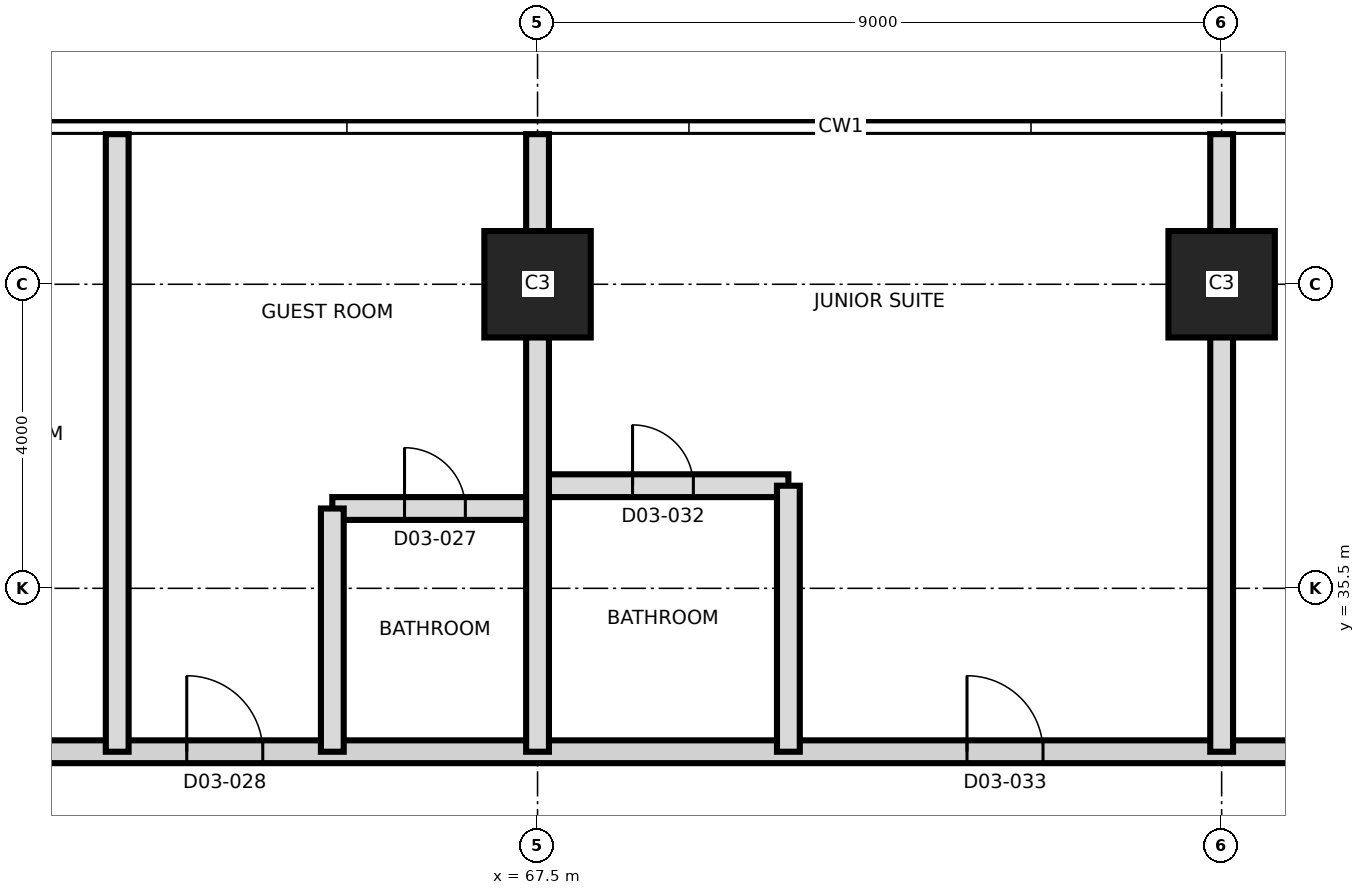
"""IFC4 building model, lengths in metres.
Left out: names, types, materials, properties, quantities, classifications, styles, units other than length and angle.
Written with IfcOpenShell. Run it as: python <this file> out.ifc"""

import sys

from ifc_helpers import new_model, si_unit, direction, frame, frame_2d, origin, origin_2d, place, context, subcontext, project, spatial, rectangle, extrude, element, fill, save


model = new_model("IFC4")
c1 = context("Model", 3, precision=1e-05, world=origin(), true_north=direction((0.0, 1.0)))
c2 = subcontext(c1, "Body", "Model", "MODEL_VIEW")
j1 = project(units=[si_unit("LENGTHUNIT", "METRE"), si_unit("PLANEANGLEUNIT", "RADIAN")], contexts=[c1])
p1 = place(None, origin())
s1 = spatial("IfcSite", under=j1, at=p1, CompositionType="ELEMENT")
p2 = place(p1, origin())
s2 = spatial("IfcBuilding", under=s1, at=p2, CompositionType="ELEMENT")
p3 = place(p2, frame((0.0, 0.0, 59.4)))
s3 = spatial("IfcBuildingStorey", under=s2, at=p3, CompositionType="ELEMENT", Elevation=59.4)
for number, where, z_axis, x_axis in (
    (1, (67.5, 39.5, 0.0), (0.0, 0.0, 1.0), (1.0, 0.0, 0.0)),
    (2, (76.5, 39.5, 0.0), (0.0, 0.0, 1.0), (1.0, 0.0, 0.0)),
):
    element("IfcColumn", number, at=place(p3, frame(where, z_axis=z_axis, x_axis=x_axis)), inside=s3, PredefinedType="COLUMN", context=c2, shape_type="SweptSolid", body=[
        extrude(rectangle(XDim=1.4, YDim=1.4, at=origin_2d()), origin(), (0.0, 0.0, 1.0), 3.7),
    ])
p4 = place(p3, frame((58.95, 33.35, 0.0), z_axis=(0.0, 0.0, 1.0), x_axis=(1.0, 0.0, 0.0)))
e3 = element("IfcWall", 3, at=p4, inside=s3, PredefinedType="PARTITIONING", context=c2, shape_type="SweptSolid", body=[
    extrude(rectangle(XDim=26.38, YDim=0.3, at=frame_2d((13.19, 0.0))), origin(), (0.0, 0.0, 1.0), 3.4),
])
p5 = place(p4, frame((0.685, 0.0, 0.0)))
e4 = element("IfcOpeningElement", 4, at=p5, cuts=e3, PredefinedType="OPENING", context=c2, shape_type="SweptSolid", body=[
    extrude(rectangle(XDim=1.2, YDim=2.1, at=frame_2d((0.6, 1.05))), frame((0.0, 0.16, 0.0), z_axis=(0.0, -1.0, 0.0), x_axis=(1.0, 0.0, 0.0)), (0.0, 0.0, 1.0), 0.32),
])
p6 = place(p4, frame((3.935, 0.0, 0.0)))
e5 = element("IfcOpeningElement", 5, at=p6, cuts=e3, PredefinedType="OPENING", context=c2, shape_type="SweptSolid", body=[
    extrude(rectangle(XDim=1.0, YDim=2.1, at=frame_2d((0.5, 1.05))), frame((0.0, 0.16, 0.0), z_axis=(0.0, -1.0, 0.0), x_axis=(1.0, 0.0, 0.0)), (0.0, 0.0, 1.0), 0.32),
])
p7 = place(p4, frame((14.2, 0.0, 0.0)))
e6 = element("IfcOpeningElement", 6, at=p7, cuts=e3, PredefinedType="OPENING", context=c2, shape_type="SweptSolid", body=[
    extrude(rectangle(XDim=1.0, YDim=2.4, at=frame_2d((0.5, 1.2))), frame((0.0, 0.16, 0.0), z_axis=(0.0, -1.0, 0.0), x_axis=(1.0, 0.0, 0.0)), (0.0, 0.0, 1.0), 0.32),
])
p8 = place(p4, frame((19.25, 0.0, 0.0)))
e7 = element("IfcOpeningElement", 7, at=p8, cuts=e3, PredefinedType="OPENING", context=c2, shape_type="SweptSolid", body=[
    extrude(rectangle(XDim=1.2, YDim=2.1, at=frame_2d((0.6, 1.05))), frame((0.0, 0.16, 0.0), z_axis=(0.0, -1.0, 0.0), x_axis=(1.0, 0.0, 0.0)), (0.0, 0.0, 1.0), 0.32),
])
p9 = place(p4, frame((22.5, 0.0, 0.0)))
e8 = element("IfcOpeningElement", 8, at=p9, cuts=e3, PredefinedType="OPENING", context=c2, shape_type="SweptSolid", body=[
    extrude(rectangle(XDim=1.0, YDim=2.1, at=frame_2d((0.5, 1.05))), frame((0.0, 0.16, 0.0), z_axis=(0.0, -1.0, 0.0), x_axis=(1.0, 0.0, 0.0)), (0.0, 0.0, 1.0), 0.32),
])
p10 = place(p3, frame((64.8, 36.55, 0.0), z_axis=(0.0, 0.0, 1.0), x_axis=(1.0, 0.0, 0.0)))
e9 = element("IfcWall", 9, at=p10, inside=s3, PredefinedType="PARTITIONING", context=c2, shape_type="SweptSolid", body=[
    extrude(rectangle(XDim=2.7, YDim=0.3, at=frame_2d((1.35, 0.0))), origin(), (0.0, 0.0, 1.0), 3.4),
])
p11 = place(p10, frame((0.95, 0.0, 0.0)))
e10 = element("IfcOpeningElement", 10, at=p11, cuts=e9, PredefinedType="OPENING", context=c2, shape_type="SweptSolid", body=[
    extrude(rectangle(XDim=0.8, YDim=2.1, at=frame_2d((0.4, 1.05))), frame((0.0, 0.16, 0.0), z_axis=(0.0, -1.0, 0.0), x_axis=(1.0, 0.0, 0.0)), (0.0, 0.0, 1.0), 0.32),
])
p12 = place(p3, frame((67.5, 36.85, 0.0), z_axis=(0.0, 0.0, 1.0), x_axis=(1.0, 0.0, 0.0)))
e11 = element("IfcWall", 11, at=p12, inside=s3, PredefinedType="PARTITIONING", context=c2, shape_type="SweptSolid", body=[
    extrude(rectangle(XDim=3.3, YDim=0.3, at=frame_2d((1.65, 0.0))), origin(), (0.0, 0.0, 1.0), 3.4),
])
p13 = place(p12, frame((1.25, 0.0, 0.0)))
e12 = element("IfcOpeningElement", 12, at=p13, cuts=e11, PredefinedType="OPENING", context=c2, shape_type="SweptSolid", body=[
    extrude(rectangle(XDim=0.8, YDim=2.1, at=frame_2d((0.4, 1.05))), frame((0.0, 0.16, 0.0), z_axis=(0.0, -1.0, 0.0), x_axis=(1.0, 0.0, 0.0)), (0.0, 0.0, 1.0), 0.32),
])
p14 = place(p3, frame((61.97, 33.35, 0.0), z_axis=(0.0, 0.0, 1.0), x_axis=(0.0, 1.0, 0.0)))
e13 = element("IfcWall", 13, at=p14, inside=s3, PredefinedType="PARTITIONING", context=c2, shape_type="SweptSolid", body=[
    extrude(rectangle(XDim=8.125, YDim=0.3, at=frame_2d((4.062, 0.0))), origin(), (0.0, 0.0, 1.0), 3.4),
])
p15 = place(p3, frame((64.8, 33.35, 0.0), z_axis=(0.0, 0.0, 1.0), x_axis=(0.0, 1.0, 0.0)))
e14 = element("IfcWall", 14, at=p15, inside=s3, PredefinedType="PARTITIONING", context=c2, shape_type="SweptSolid", body=[
    extrude(rectangle(XDim=3.2, YDim=0.3, at=frame_2d((1.6, 0.0))), origin(), (0.0, 0.0, 1.0), 3.4),
])
p16 = place(p3, frame((67.5, 33.35, 0.0), z_axis=(0.0, 0.0, 1.0), x_axis=(0.0, 1.0, 0.0)))
e15 = element("IfcWall", 15, at=p16, inside=s3, PredefinedType="PARTITIONING", context=c2, shape_type="SweptSolid", body=[
    extrude(rectangle(XDim=8.125, YDim=0.3, at=frame_2d((4.062, 0.0))), origin(), (0.0, 0.0, 1.0), 3.4),
])
p17 = place(p3, frame((70.8, 33.35, 0.0), z_axis=(0.0, 0.0, 1.0), x_axis=(0.0, 1.0, 0.0)))
e16 = element("IfcWall", 16, at=p17, inside=s3, PredefinedType="PARTITIONING", context=c2, shape_type="SweptSolid", body=[
    extrude(rectangle(XDim=3.5, YDim=0.3, at=frame_2d((1.75, 0.0))), origin(), (0.0, 0.0, 1.0), 3.4),
])
p18 = place(p3, frame((76.5, 33.35, 0.0), z_axis=(0.0, 0.0, 1.0), x_axis=(0.0, 1.0, 0.0)))
e17 = element("IfcWall", 17, at=p18, inside=s3, PredefinedType="PARTITIONING", context=c2, shape_type="SweptSolid", body=[
    extrude(rectangle(XDim=8.125, YDim=0.3, at=frame_2d((4.062, 0.0))), origin(), (0.0, 0.0, 1.0), 3.4),
])
p19 = place(p11, origin())
e18 = element("IfcDoor", 18, at=p19, inside=s3, OperationType="SINGLE_SWING_RIGHT", PredefinedType="DOOR", context=c2, shape_type="SweptSolid", body=[
    extrude(rectangle(XDim=0.8, YDim=2.1, at=frame_2d((0.4, 1.05))), frame((0.0, 0.025, 0.0), z_axis=(0.0, -1.0, 0.0), x_axis=(1.0, 0.0, 0.0)), (0.0, 0.0, 1.0), 0.05),
])
fill(e10, e18)
p20 = place(p6, origin())
e19 = element("IfcDoor", 19, at=p20, inside=s3, OperationType="SINGLE_SWING_LEFT", PredefinedType="DOOR", context=c2, shape_type="SweptSolid", body=[
    extrude(rectangle(XDim=1.0, YDim=2.1, at=frame_2d((0.5, 1.05))), frame((0.0, 0.025, 0.0), z_axis=(0.0, -1.0, 0.0), x_axis=(1.0, 0.0, 0.0)), (0.0, 0.0, 1.0), 0.05),
])
fill(e5, e19)
p21 = place(p13, origin())
e20 = element("IfcDoor", 20, at=p21, inside=s3, OperationType="SINGLE_SWING_LEFT", PredefinedType="DOOR", context=c2, shape_type="SweptSolid", body=[
    extrude(rectangle(XDim=0.8, YDim=2.1, at=frame_2d((0.4, 1.05))), frame((0.0, 0.025, 0.0), z_axis=(0.0, -1.0, 0.0), x_axis=(1.0, 0.0, 0.0)), (0.0, 0.0, 1.0), 0.05),
])
fill(e12, e20)
p22 = place(p7, origin())
e21 = element("IfcDoor", 21, at=p22, inside=s3, OperationType="SINGLE_SWING_LEFT", PredefinedType="DOOR", context=c2, shape_type="SweptSolid", body=[
    extrude(rectangle(XDim=1.0, YDim=2.4, at=frame_2d((0.5, 1.2))), frame((0.0, 0.025, 0.0), z_axis=(0.0, -1.0, 0.0), x_axis=(1.0, 0.0, 0.0)), (0.0, 0.0, 1.0), 0.05),
])
fill(e6, e21)
save(model, sys.argv[1])
